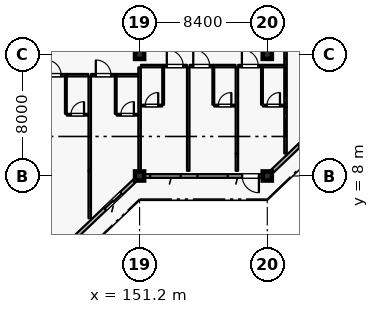
"""IFC4 building model, lengths in metres.
Left out: names, types, materials, properties, quantities, classifications, styles, units other than length and angle.
Written with IfcOpenShell. Run it as: python <this file> out.ifc"""

import sys

from ifc_helpers import new_model, si_unit, direction, frame, frame_2d, origin, origin_2d, place, context, subcontext, project, spatial, rectangle, extrude, element, fill, save


model = new_model("IFC4")
c1 = context("Model", 3, precision=1e-05, world=origin(), true_north=direction((0.0, 1.0)))
c2 = subcontext(c1, "Body", "Model", "MODEL_VIEW")
j1 = project(units=[si_unit("LENGTHUNIT", "METRE"), si_unit("PLANEANGLEUNIT", "RADIAN")], contexts=[c1])
p1 = place(None, origin())
s1 = spatial("IfcSite", under=j1, at=p1, CompositionType="ELEMENT")
p2 = place(p1, origin())
s2 = spatial("IfcBuilding", under=s1, at=p2, CompositionType="ELEMENT")
p3 = place(p2, frame((0.0, 0.0, 39.6)))
s3 = spatial("IfcBuildingStorey", under=s2, at=p3, CompositionType="ELEMENT", Elevation=39.6)
for number, where, z_axis, x_axis in (
    (1, (151.2, 8.0, 0.0), (0.0, 0.0, 1.0), (1.0, 0.0, 0.0)),
    (2, (159.6, 8.0, 0.0), (0.0, 0.0, 1.0), (1.0, 0.0, 0.0)),
    (3, (151.2, 16.0, 0.0), (0.0, 0.0, 1.0), (1.0, 0.0, 0.0)),
    (4, (159.6, 16.0, 0.0), (0.0, 0.0, 1.0), (1.0, 0.0, 0.0)),
):
    element("IfcColumn", number, at=place(p3, frame(where, z_axis=z_axis, x_axis=x_axis)), inside=s3, PredefinedType="COLUMN", context=c2, shape_type="SweptSolid", body=[
        extrude(rectangle(XDim=0.6, YDim=0.6, at=origin_2d()), origin(), (0.0, 0.0, 1.0), 3.6),
    ])
p4 = place(p3, frame((150.9, 7.714, 0.0), z_axis=(0.0, 0.0, 1.0), x_axis=(-0.724145477467, -0.689647248573, 0.0)))
e5 = element("IfcWall", 5, at=p4, inside=s3, PredefinedType="SOLIDWALL", context=c2, shape_type="SweptSolid", body=[
    extrude(rectangle(XDim=10.771, YDim=0.24, at=frame_2d((5.385, 0.0))), origin(), (0.0, 0.0, 1.0), 2.94),
])
p5 = place(p4, frame((1.238, 0.0, 0.0)))
e6 = element("IfcOpeningElement", 6, at=p5, cuts=e5, PredefinedType="OPENING", context=c2, shape_type="SweptSolid", body=[
    extrude(rectangle(XDim=1.5, YDim=2.25, at=frame_2d((0.75, 1.125))), frame((0.0, 0.13, 0.0), z_axis=(0.0, -1.0, 0.0), x_axis=(1.0, 0.0, 0.0)), (0.0, 0.0, 1.0), 0.26),
])
p6 = place(p4, frame((5.58, 0.0, 0.8)))
e7 = element("IfcOpeningElement", 7, at=p6, cuts=e5, PredefinedType="OPENING", context=c2, shape_type="SweptSolid", body=[
    extrude(rectangle(XDim=1.6, YDim=1.6, at=frame_2d((0.8, 0.8))), frame((0.0, 0.13, 0.0), z_axis=(0.0, -1.0, 0.0), x_axis=(1.0, 0.0, 0.0)), (0.0, 0.0, 1.0), 0.26),
])
p7 = place(p4, frame((8.977, 0.0, 0.8)))
e8 = element("IfcOpeningElement", 8, at=p7, cuts=e5, PredefinedType="OPENING", context=c2, shape_type="SweptSolid", body=[
    extrude(rectangle(XDim=1.6, YDim=1.6, at=frame_2d((0.8, 0.8))), frame((0.0, 0.13, 0.0), z_axis=(0.0, -1.0, 0.0), x_axis=(1.0, 0.0, 0.0)), (0.0, 0.0, 1.0), 0.26),
])
p8 = place(p3, frame((159.3, 8.0, 0.0), z_axis=(0.0, 0.0, 1.0), x_axis=(-1.0, 0.0, 0.0)))
e9 = element("IfcWall", 9, at=p8, inside=s3, PredefinedType="SOLIDWALL", context=c2, shape_type="SweptSolid", body=[
    extrude(rectangle(XDim=7.8, YDim=0.24, at=frame_2d((3.9, 0.0))), origin(), (0.0, 0.0, 1.0), 2.94),
])
p9 = place(p8, frame((0.25, 0.0, 0.0)))
e10 = element("IfcOpeningElement", 10, at=p9, cuts=e9, PredefinedType="OPENING", context=c2, shape_type="SweptSolid", body=[
    extrude(rectangle(XDim=1.1, YDim=2.2, at=frame_2d((0.55, 1.1))), frame((0.0, 0.13, 0.0), z_axis=(0.0, -1.0, 0.0), x_axis=(1.0, 0.0, 0.0)), (0.0, 0.0, 1.0), 0.26),
])
p10 = place(p8, frame((2.3, 0.0, 0.8)))
e11 = element("IfcOpeningElement", 11, at=p10, cuts=e9, PredefinedType="OPENING", context=c2, shape_type="SweptSolid", body=[
    extrude(rectangle(XDim=2.0, YDim=1.75, at=frame_2d((1.0, 0.875))), frame((0.0, 0.13, 0.0), z_axis=(0.0, -1.0, 0.0), x_axis=(1.0, 0.0, 0.0)), (0.0, 0.0, 1.0), 0.26),
])
p11 = place(p8, frame((5.4, 0.0, 0.8)))
e12 = element("IfcOpeningElement", 12, at=p11, cuts=e9, PredefinedType="OPENING", context=c2, shape_type="SweptSolid", body=[
    extrude(rectangle(XDim=2.0, YDim=1.75, at=frame_2d((1.0, 0.875))), frame((0.0, 0.13, 0.0), z_axis=(0.0, -1.0, 0.0), x_axis=(1.0, 0.0, 0.0)), (0.0, 0.0, 1.0), 0.26),
])
p12 = place(p3, frame((167.7, 15.714, 0.0), z_axis=(0.0, 0.0, 1.0), x_axis=(-0.724156257633, -0.689635928973, 0.0)))
e13 = element("IfcWall", 13, at=p12, inside=s3, PredefinedType="SOLIDWALL", context=c2, shape_type="SweptSolid", body=[
    extrude(rectangle(XDim=10.771, YDim=0.24, at=frame_2d((5.386, 0.0))), origin(), (0.0, 0.0, 1.0), 2.94),
])
p13 = place(p12, frame((2.15, 0.0, 0.0)))
e14 = element("IfcOpeningElement", 14, at=p13, cuts=e13, PredefinedType="OPENING", context=c2, shape_type="SweptSolid", body=[
    extrude(rectangle(XDim=1.5, YDim=2.25, at=frame_2d((0.75, 1.125))), frame((0.0, 0.13, 0.0), z_axis=(0.0, -1.0, 0.0), x_axis=(1.0, 0.0, 0.0)), (0.0, 0.0, 1.0), 0.26),
])
p14 = place(p12, frame((6.319, 0.0, 0.8)))
e15 = element("IfcOpeningElement", 15, at=p14, cuts=e13, PredefinedType="OPENING", context=c2, shape_type="SweptSolid", body=[
    extrude(rectangle(XDim=2.0, YDim=1.75, at=frame_2d((1.0, 0.875))), frame((0.0, 0.13, 0.0), z_axis=(0.0, -1.0, 0.0), x_axis=(1.0, 0.0, 0.0)), (0.0, 0.0, 1.0), 0.26),
])
p15 = place(p3, frame((144.73, 14.63, 0.0), z_axis=(0.0, 0.0, 1.0), x_axis=(1.0, 0.0, 0.0)))
e16 = element("IfcWall", 16, at=p15, inside=s3, PredefinedType="PARTITIONING", context=c2, shape_type="SweptSolid", body=[
    extrude(rectangle(XDim=1.62, YDim=0.16, at=frame_2d((0.81, 0.0))), origin(), (0.0, 0.0, 1.0), 3.335),
])
p16 = place(p15, frame((0.31, 0.0, 0.0)))
e17 = element("IfcOpeningElement", 17, at=p16, cuts=e16, PredefinedType="OPENING", context=c2, shape_type="SweptSolid", body=[
    extrude(rectangle(XDim=1.0, YDim=2.25, at=frame_2d((0.5, 1.125))), frame((0.0, 0.09, 0.0), z_axis=(0.0, -1.0, 0.0), x_axis=(1.0, 0.0, 0.0)), (0.0, 0.0, 1.0), 0.18),
])
p17 = place(p3, frame((146.36, 14.63, 0.0), z_axis=(0.0, 0.0, 1.0), x_axis=(1.0, 0.0, 0.0)))
e18 = element("IfcWall", 18, at=p17, inside=s3, PredefinedType="PARTITIONING", context=c2, shape_type="SweptSolid", body=[
    extrude(rectangle(XDim=1.47, YDim=0.16, at=frame_2d((0.735, 0.0))), origin(), (0.0, 0.0, 1.0), 3.335),
])
p18 = place(p3, frame((146.35, 12.09, 0.0), z_axis=(0.0, 0.0, 1.0), x_axis=(0.0, 1.0, 0.0)))
e19 = element("IfcWall", 19, at=p18, inside=s3, PredefinedType="PARTITIONING", context=c2, shape_type="SweptSolid", body=[
    extrude(rectangle(XDim=2.45, YDim=0.115, at=frame_2d((1.225, 0.0))), origin(), (0.0, 0.0, 1.0), 3.335),
])
p19 = place(p3, frame((146.41, 12.03, 0.0), z_axis=(0.0, 0.0, 1.0), x_axis=(1.0, 0.0, 0.0)))
e20 = element("IfcWall", 20, at=p19, inside=s3, PredefinedType="PARTITIONING", context=c2, shape_type="SweptSolid", body=[
    extrude(rectangle(XDim=1.41, YDim=0.115, at=frame_2d((0.705, 0.0))), origin(), (0.0, 0.0, 1.0), 3.335),
])
p20 = place(p19, frame((0.275, 0.0, 0.0)))
e21 = element("IfcOpeningElement", 21, at=p20, cuts=e20, PredefinedType="OPENING", context=c2, shape_type="SweptSolid", body=[
    extrude(rectangle(XDim=0.86, YDim=2.12, at=frame_2d((0.43, 1.06))), frame((0.0, 0.067, 0.0), z_axis=(0.0, -1.0, 0.0), x_axis=(1.0, 0.0, 0.0)), (0.0, 0.0, 1.0), 0.135),
])
p21 = place(p3, frame((147.92, 5.22, 0.0), z_axis=(0.0, 0.0, 1.0), x_axis=(0.0, 1.0, 0.0)))
e22 = element("IfcWall", 22, at=p21, inside=s3, PredefinedType="PARTITIONING", context=c2, shape_type="SweptSolid", body=[
    extrude(rectangle(XDim=3.11, YDim=0.16, at=frame_2d((1.555, 0.0))), origin(), (0.0, 0.0, 1.0), 3.335),
])
p22 = place(p3, frame((148.01, 14.63, 0.0), z_axis=(0.0, 0.0, 1.0), x_axis=(1.0, 0.0, 0.0)))
e23 = element("IfcWall", 23, at=p22, inside=s3, PredefinedType="PARTITIONING", context=c2, shape_type="SweptSolid", body=[
    extrude(rectangle(XDim=1.62, YDim=0.16, at=frame_2d((0.81, 0.0))), origin(), (0.0, 0.0, 1.0), 3.335),
])
p23 = place(p22, frame((0.31, 0.0, 0.0)))
e24 = element("IfcOpeningElement", 24, at=p23, cuts=e23, PredefinedType="OPENING", context=c2, shape_type="SweptSolid", body=[
    extrude(rectangle(XDim=1.0, YDim=2.25, at=frame_2d((0.5, 1.125))), frame((0.0, 0.09, 0.0), z_axis=(0.0, -1.0, 0.0), x_axis=(1.0, 0.0, 0.0)), (0.0, 0.0, 1.0), 0.18),
])
p24 = place(p3, frame((149.64, 14.63, 0.0), z_axis=(0.0, 0.0, 1.0), x_axis=(1.0, 0.0, 0.0)))
e25 = element("IfcWall", 25, at=p24, inside=s3, PredefinedType="PARTITIONING", context=c2, shape_type="SweptSolid", body=[
    extrude(rectangle(XDim=1.47, YDim=0.16, at=frame_2d((0.735, 0.0))), origin(), (0.0, 0.0, 1.0), 3.335),
])
p25 = place(p3, frame((149.63, 12.09, 0.0), z_axis=(0.0, 0.0, 1.0), x_axis=(0.0, 1.0, 0.0)))
e26 = element("IfcWall", 26, at=p25, inside=s3, PredefinedType="PARTITIONING", context=c2, shape_type="SweptSolid", body=[
    extrude(rectangle(XDim=2.45, YDim=0.115, at=frame_2d((1.225, 0.0))), origin(), (0.0, 0.0, 1.0), 3.335),
])
p26 = place(p3, frame((149.69, 12.03, 0.0), z_axis=(0.0, 0.0, 1.0), x_axis=(1.0, 0.0, 0.0)))
e27 = element("IfcWall", 27, at=p26, inside=s3, PredefinedType="PARTITIONING", context=c2, shape_type="SweptSolid", body=[
    extrude(rectangle(XDim=1.41, YDim=0.115, at=frame_2d((0.705, 0.0))), origin(), (0.0, 0.0, 1.0), 3.335),
])
p27 = place(p26, frame((0.275, 0.0, 0.0)))
e28 = element("IfcOpeningElement", 28, at=p27, cuts=e27, PredefinedType="OPENING", context=c2, shape_type="SweptSolid", body=[
    extrude(rectangle(XDim=0.86, YDim=2.12, at=frame_2d((0.43, 1.06))), frame((0.0, 0.067, 0.0), z_axis=(0.0, -1.0, 0.0), x_axis=(1.0, 0.0, 0.0)), (0.0, 0.0, 1.0), 0.135),
])
p28 = place(p3, frame((147.92, 8.34, 0.0), z_axis=(0.0, 0.0, 1.0), x_axis=(0.0, 1.0, 0.0)))
e29 = element("IfcWall", 29, at=p28, inside=s3, PredefinedType="PARTITIONING", context=c2, shape_type="SweptSolid", body=[
    extrude(rectangle(XDim=6.2, YDim=0.16, at=frame_2d((3.1, 0.0))), origin(), (0.0, 0.0, 1.0), 3.335),
])
p29 = place(p3, frame((151.29, 15.23, 0.0), z_axis=(0.0, 0.0, 1.0), x_axis=(1.0, 0.0, 0.0)))
e30 = element("IfcWall", 30, at=p29, inside=s3, PredefinedType="PARTITIONING", context=c2, shape_type="SweptSolid", body=[
    extrude(rectangle(XDim=1.45, YDim=0.16, at=frame_2d((0.725, 0.0))), origin(), (0.0, 0.0, 1.0), 3.335),
])
p30 = place(p3, frame((152.75, 15.23, 0.0), z_axis=(0.0, 0.0, 1.0), x_axis=(1.0, 0.0, 0.0)))
e31 = element("IfcWall", 31, at=p30, inside=s3, PredefinedType="PARTITIONING", context=c2, shape_type="SweptSolid", body=[
    extrude(rectangle(XDim=1.56, YDim=0.16, at=frame_2d((0.78, 0.0))), origin(), (0.0, 0.0, 1.0), 3.335),
])
p31 = place(p30, frame((0.24, 0.0, 0.0)))
e32 = element("IfcOpeningElement", 32, at=p31, cuts=e31, PredefinedType="OPENING", context=c2, shape_type="SweptSolid", body=[
    extrude(rectangle(XDim=1.08, YDim=2.3, at=frame_2d((0.54, 1.15))), frame((0.0, 0.09, 0.0), z_axis=(0.0, -1.0, 0.0), x_axis=(1.0, 0.0, 0.0)), (0.0, 0.0, 1.0), 0.18),
])
p32 = place(p3, frame((152.75, 12.69, 0.0), z_axis=(0.0, 0.0, 1.0), x_axis=(0.0, 1.0, 0.0)))
e33 = element("IfcWall", 33, at=p32, inside=s3, PredefinedType="PARTITIONING", context=c2, shape_type="SweptSolid", body=[
    extrude(rectangle(XDim=2.45, YDim=0.115, at=frame_2d((1.225, 0.0))), origin(), (0.0, 0.0, 1.0), 3.335),
])
p33 = place(p3, frame((151.3, 12.63, 0.0), z_axis=(0.0, 0.0, 1.0), x_axis=(1.0, 0.0, 0.0)))
e34 = element("IfcWall", 34, at=p33, inside=s3, PredefinedType="PARTITIONING", context=c2, shape_type="SweptSolid", body=[
    extrude(rectangle(XDim=1.39, YDim=0.115, at=frame_2d((0.695, 0.0))), origin(), (0.0, 0.0, 1.0), 3.335),
])
p34 = place(p33, frame((0.265, 0.0, 0.0)))
e35 = element("IfcOpeningElement", 35, at=p34, cuts=e34, PredefinedType="OPENING", context=c2, shape_type="SweptSolid", body=[
    extrude(rectangle(XDim=0.86, YDim=2.12, at=frame_2d((0.43, 1.06))), frame((0.0, 0.067, 0.0), z_axis=(0.0, -1.0, 0.0), x_axis=(1.0, 0.0, 0.0)), (0.0, 0.0, 1.0), 0.135),
])
p35 = place(p3, frame((151.2, 8.34, 0.0), z_axis=(0.0, 0.0, 1.0), x_axis=(0.0, 1.0, 0.0)))
e36 = element("IfcWall", 36, at=p35, inside=s3, PredefinedType="PARTITIONING", context=c2, shape_type="SweptSolid", body=[
    extrude(rectangle(XDim=6.8, YDim=0.16, at=frame_2d((3.4, 0.0))), origin(), (0.0, 0.0, 1.0), 2.74),
])
p36 = place(p3, frame((154.49, 15.23, 0.0), z_axis=(0.0, 0.0, 1.0), x_axis=(1.0, 0.0, 0.0)))
e37 = element("IfcWall", 37, at=p36, inside=s3, PredefinedType="PARTITIONING", context=c2, shape_type="SweptSolid", body=[
    extrude(rectangle(XDim=1.56, YDim=0.16, at=frame_2d((0.78, 0.0))), origin(), (0.0, 0.0, 1.0), 3.335),
])
p37 = place(p36, frame((0.24, 0.0, 0.0)))
e38 = element("IfcOpeningElement", 38, at=p37, cuts=e37, PredefinedType="OPENING", context=c2, shape_type="SweptSolid", body=[
    extrude(rectangle(XDim=1.08, YDim=2.3, at=frame_2d((0.54, 1.15))), frame((0.0, 0.09, 0.0), z_axis=(0.0, -1.0, 0.0), x_axis=(1.0, 0.0, 0.0)), (0.0, 0.0, 1.0), 0.18),
])
p38 = place(p3, frame((156.06, 15.23, 0.0), z_axis=(0.0, 0.0, 1.0), x_axis=(1.0, 0.0, 0.0)))
e39 = element("IfcWall", 39, at=p38, inside=s3, PredefinedType="PARTITIONING", context=c2, shape_type="SweptSolid", body=[
    extrude(rectangle(XDim=1.45, YDim=0.16, at=frame_2d((0.725, 0.0))), origin(), (0.0, 0.0, 1.0), 3.335),
])
p39 = place(p3, frame((156.05, 12.69, 0.0), z_axis=(0.0, 0.0, 1.0), x_axis=(0.0, 1.0, 0.0)))
e40 = element("IfcWall", 40, at=p39, inside=s3, PredefinedType="PARTITIONING", context=c2, shape_type="SweptSolid", body=[
    extrude(rectangle(XDim=2.45, YDim=0.115, at=frame_2d((1.225, 0.0))), origin(), (0.0, 0.0, 1.0), 3.335),
])
p40 = place(p3, frame((156.11, 12.63, 0.0), z_axis=(0.0, 0.0, 1.0), x_axis=(1.0, 0.0, 0.0)))
e41 = element("IfcWall", 41, at=p40, inside=s3, PredefinedType="PARTITIONING", context=c2, shape_type="SweptSolid", body=[
    extrude(rectangle(XDim=1.39, YDim=0.115, at=frame_2d((0.695, 0.0))), origin(), (0.0, 0.0, 1.0), 3.335),
])
p41 = place(p40, frame((0.265, 0.0, 0.0)))
e42 = element("IfcOpeningElement", 42, at=p41, cuts=e41, PredefinedType="OPENING", context=c2, shape_type="SweptSolid", body=[
    extrude(rectangle(XDim=0.86, YDim=2.12, at=frame_2d((0.43, 1.06))), frame((0.0, 0.067, 0.0), z_axis=(0.0, -1.0, 0.0), x_axis=(1.0, 0.0, 0.0)), (0.0, 0.0, 1.0), 0.135),
])
p42 = place(p3, frame((154.4, 8.34, 0.0), z_axis=(0.0, 0.0, 1.0), x_axis=(0.0, 1.0, 0.0)))
e43 = element("IfcWall", 43, at=p42, inside=s3, PredefinedType="PARTITIONING", context=c2, shape_type="SweptSolid", body=[
    extrude(rectangle(XDim=6.8, YDim=0.16, at=frame_2d((3.4, 0.0))), origin(), (0.0, 0.0, 1.0), 3.335),
])
p43 = place(p3, frame((157.6, 8.34, 0.0), z_axis=(0.0, 0.0, 1.0), x_axis=(0.0, 1.0, 0.0)))
e44 = element("IfcWall", 44, at=p43, inside=s3, PredefinedType="PARTITIONING", context=c2, shape_type="SweptSolid", body=[
    extrude(rectangle(XDim=1.13, YDim=0.16, at=frame_2d((0.565, 0.0))), origin(), (0.0, 0.0, 1.0), 3.335),
])
p44 = place(p3, frame((157.69, 15.23, 0.0), z_axis=(0.0, 0.0, 1.0), x_axis=(1.0, 0.0, 0.0)))
e45 = element("IfcWall", 45, at=p44, inside=s3, PredefinedType="PARTITIONING", context=c2, shape_type="SweptSolid", body=[
    extrude(rectangle(XDim=1.56, YDim=0.16, at=frame_2d((0.78, 0.0))), origin(), (0.0, 0.0, 1.0), 3.335),
])
p45 = place(p44, frame((0.24, 0.0, 0.0)))
e46 = element("IfcOpeningElement", 46, at=p45, cuts=e45, PredefinedType="OPENING", context=c2, shape_type="SweptSolid", body=[
    extrude(rectangle(XDim=1.08, YDim=2.3, at=frame_2d((0.54, 1.15))), frame((0.0, 0.09, 0.0), z_axis=(0.0, -1.0, 0.0), x_axis=(1.0, 0.0, 0.0)), (0.0, 0.0, 1.0), 0.18),
])
p46 = place(p3, frame((159.26, 15.23, 0.0), z_axis=(0.0, 0.0, 1.0), x_axis=(1.0, 0.0, 0.0)))
e47 = element("IfcWall", 47, at=p46, inside=s3, PredefinedType="PARTITIONING", context=c2, shape_type="SweptSolid", body=[
    extrude(rectangle(XDim=1.45, YDim=0.16, at=frame_2d((0.725, 0.0))), origin(), (0.0, 0.0, 1.0), 3.335),
])
p47 = place(p3, frame((159.25, 12.69, 0.0), z_axis=(0.0, 0.0, 1.0), x_axis=(0.0, 1.0, 0.0)))
e48 = element("IfcWall", 48, at=p47, inside=s3, PredefinedType="PARTITIONING", context=c2, shape_type="SweptSolid", body=[
    extrude(rectangle(XDim=2.45, YDim=0.115, at=frame_2d((1.225, 0.0))), origin(), (0.0, 0.0, 1.0), 3.335),
])
p48 = place(p3, frame((159.31, 12.63, 0.0), z_axis=(0.0, 0.0, 1.0), x_axis=(1.0, 0.0, 0.0)))
e49 = element("IfcWall", 49, at=p48, inside=s3, PredefinedType="PARTITIONING", context=c2, shape_type="SweptSolid", body=[
    extrude(rectangle(XDim=1.39, YDim=0.115, at=frame_2d((0.695, 0.0))), origin(), (0.0, 0.0, 1.0), 3.335),
])
p49 = place(p48, frame((0.265, 0.0, 0.0)))
e50 = element("IfcOpeningElement", 50, at=p49, cuts=e49, PredefinedType="OPENING", context=c2, shape_type="SweptSolid", body=[
    extrude(rectangle(XDim=0.86, YDim=2.12, at=frame_2d((0.43, 1.06))), frame((0.0, 0.067, 0.0), z_axis=(0.0, -1.0, 0.0), x_axis=(1.0, 0.0, 0.0)), (0.0, 0.0, 1.0), 0.135),
])
p50 = place(p3, frame((157.6, 9.48, 0.0), z_axis=(0.0, 0.0, 1.0), x_axis=(0.0, 1.0, 0.0)))
e51 = element("IfcWall", 51, at=p50, inside=s3, PredefinedType="PARTITIONING", context=c2, shape_type="SweptSolid", body=[
    extrude(rectangle(XDim=5.66, YDim=0.16, at=frame_2d((2.83, 0.0))), origin(), (0.0, 0.0, 1.0), 3.335),
])
p51 = place(p3, frame((160.8, 9.48, 0.0), z_axis=(0.0, 0.0, 1.0), x_axis=(0.0, 1.0, 0.0)))
e52 = element("IfcWall", 52, at=p51, inside=s3, PredefinedType="PARTITIONING", context=c2, shape_type="SweptSolid", body=[
    extrude(rectangle(XDim=3.04, YDim=0.16, at=frame_2d((1.52, 0.0))), origin(), (0.0, 0.0, 1.0), 3.335),
])
p52 = place(p3, frame((160.8, 12.53, 0.0), z_axis=(0.0, 0.0, 1.0), x_axis=(0.0, 1.0, 0.0)))
e53 = element("IfcWall", 53, at=p52, inside=s3, PredefinedType="PARTITIONING", context=c2, shape_type="SweptSolid", body=[
    extrude(rectangle(XDim=9.55, YDim=0.16, at=frame_2d((4.775, 0.0))), origin(), (0.0, 0.0, 1.0), 3.335),
])
p53 = place(p5, origin())
e54 = element("IfcDoor", 54, at=p53, inside=s3, OperationType="SLIDING_TO_LEFT", PredefinedType="DOOR", context=c2, shape_type="SweptSolid", body=[
    extrude(rectangle(XDim=1.5, YDim=2.25, at=frame_2d((0.75, 1.125))), frame((0.0, 0.025, 0.0), z_axis=(0.0, -1.0, 0.0), x_axis=(1.0, 0.0, 0.0)), (0.0, 0.0, 1.0), 0.05),
])
fill(e6, e54)
p54 = place(p9, origin())
e55 = element("IfcDoor", 55, at=p54, inside=s3, OperationType="SINGLE_SWING_LEFT", PredefinedType="DOOR", context=c2, shape_type="SweptSolid", body=[
    extrude(rectangle(XDim=1.1, YDim=2.2, at=frame_2d((0.55, 1.1))), frame((0.0, 0.025, 0.0), z_axis=(0.0, -1.0, 0.0), x_axis=(1.0, 0.0, 0.0)), (0.0, 0.0, 1.0), 0.05),
])
fill(e10, e55)
p55 = place(p10, origin())
e56 = element("IfcWindow", 56, at=p55, inside=s3, PartitioningType="DOUBLE_PANEL_VERTICAL", PredefinedType="WINDOW", context=c2, shape_type="SweptSolid", body=[
    extrude(rectangle(XDim=2.0, YDim=1.75, at=frame_2d((1.0, 0.875))), frame((0.0, 0.03, 0.0), z_axis=(0.0, -1.0, 0.0), x_axis=(1.0, 0.0, 0.0)), (0.0, 0.0, 1.0), 0.06),
])
fill(e11, e56)
p56 = place(p11, origin())
e57 = element("IfcWindow", 57, at=p56, inside=s3, PartitioningType="DOUBLE_PANEL_VERTICAL", PredefinedType="WINDOW", context=c2, shape_type="SweptSolid", body=[
    extrude(rectangle(XDim=2.0, YDim=1.75, at=frame_2d((1.0, 0.875))), frame((0.0, 0.03, 0.0), z_axis=(0.0, -1.0, 0.0), x_axis=(1.0, 0.0, 0.0)), (0.0, 0.0, 1.0), 0.06),
])
fill(e12, e57)
p57 = place(p14, origin())
e58 = element("IfcWindow", 58, at=p57, inside=s3, PartitioningType="DOUBLE_PANEL_VERTICAL", PredefinedType="WINDOW", context=c2, shape_type="SweptSolid", body=[
    extrude(rectangle(XDim=2.0, YDim=1.75, at=frame_2d((1.0, 0.875))), frame((0.0, 0.03, 0.0), z_axis=(0.0, -1.0, 0.0), x_axis=(1.0, 0.0, 0.0)), (0.0, 0.0, 1.0), 0.06),
])
fill(e15, e58)
p58 = place(p16, origin())
e59 = element("IfcDoor", 59, at=p58, inside=s3, OperationType="SINGLE_SWING_LEFT", PredefinedType="DOOR", context=c2, shape_type="SweptSolid", body=[
    extrude(rectangle(XDim=1.0, YDim=2.25, at=frame_2d((0.5, 1.125))), frame((0.0, 0.025, 0.0), z_axis=(0.0, -1.0, 0.0), x_axis=(1.0, 0.0, 0.0)), (0.0, 0.0, 1.0), 0.05),
])
fill(e17, e59)
p59 = place(p20, origin())
e60 = element("IfcDoor", 60, at=p59, inside=s3, OperationType="SINGLE_SWING_RIGHT", PredefinedType="DOOR", context=c2, shape_type="SweptSolid", body=[
    extrude(rectangle(XDim=0.86, YDim=2.12, at=frame_2d((0.43, 1.06))), frame((0.0, 0.025, 0.0), z_axis=(0.0, -1.0, 0.0), x_axis=(1.0, 0.0, 0.0)), (0.0, 0.0, 1.0), 0.05),
])
fill(e21, e60)
p60 = place(p23, origin())
e61 = element("IfcDoor", 61, at=p60, inside=s3, OperationType="SINGLE_SWING_LEFT", PredefinedType="DOOR", context=c2, shape_type="SweptSolid", body=[
    extrude(rectangle(XDim=1.0, YDim=2.25, at=frame_2d((0.5, 1.125))), frame((0.0, 0.025, 0.0), z_axis=(0.0, -1.0, 0.0), x_axis=(1.0, 0.0, 0.0)), (0.0, 0.0, 1.0), 0.05),
])
fill(e24, e61)
p61 = place(p27, origin())
e62 = element("IfcDoor", 62, at=p61, inside=s3, OperationType="SINGLE_SWING_RIGHT", PredefinedType="DOOR", context=c2, shape_type="SweptSolid", body=[
    extrude(rectangle(XDim=0.86, YDim=2.12, at=frame_2d((0.43, 1.06))), frame((0.0, 0.025, 0.0), z_axis=(0.0, -1.0, 0.0), x_axis=(1.0, 0.0, 0.0)), (0.0, 0.0, 1.0), 0.05),
])
fill(e28, e62)
p62 = place(p31, origin())
e63 = element("IfcDoor", 63, at=p62, inside=s3, OperationType="SINGLE_SWING_LEFT", PredefinedType="DOOR", context=c2, shape_type="SweptSolid", body=[
    extrude(rectangle(XDim=1.08, YDim=2.3, at=frame_2d((0.54, 1.15))), frame((0.0, 0.025, 0.0), z_axis=(0.0, -1.0, 0.0), x_axis=(1.0, 0.0, 0.0)), (0.0, 0.0, 1.0), 0.05),
])
fill(e32, e63)
p63 = place(p34, origin())
e64 = element("IfcDoor", 64, at=p63, inside=s3, OperationType="SINGLE_SWING_RIGHT", PredefinedType="DOOR", context=c2, shape_type="SweptSolid", body=[
    extrude(rectangle(XDim=0.86, YDim=2.12, at=frame_2d((0.43, 1.06))), frame((0.0, 0.025, 0.0), z_axis=(0.0, -1.0, 0.0), x_axis=(1.0, 0.0, 0.0)), (0.0, 0.0, 1.0), 0.05),
])
fill(e35, e64)
p64 = place(p37, origin())
e65 = element("IfcDoor", 65, at=p64, inside=s3, OperationType="SINGLE_SWING_LEFT", PredefinedType="DOOR", context=c2, shape_type="SweptSolid", body=[
    extrude(rectangle(XDim=1.08, YDim=2.3, at=frame_2d((0.54, 1.15))), frame((0.0, 0.025, 0.0), z_axis=(0.0, -1.0, 0.0), x_axis=(1.0, 0.0, 0.0)), (0.0, 0.0, 1.0), 0.05),
])
fill(e38, e65)
p65 = place(p41, origin())
e66 = element("IfcDoor", 66, at=p65, inside=s3, OperationType="SINGLE_SWING_RIGHT", PredefinedType="DOOR", context=c2, shape_type="SweptSolid", body=[
    extrude(rectangle(XDim=0.86, YDim=2.12, at=frame_2d((0.43, 1.06))), frame((0.0, 0.025, 0.0), z_axis=(0.0, -1.0, 0.0), x_axis=(1.0, 0.0, 0.0)), (0.0, 0.0, 1.0), 0.05),
])
fill(e42, e66)
p66 = place(p45, origin())
e67 = element("IfcDoor", 67, at=p66, inside=s3, OperationType="SINGLE_SWING_LEFT", PredefinedType="DOOR", context=c2, shape_type="SweptSolid", body=[
    extrude(rectangle(XDim=1.08, YDim=2.3, at=frame_2d((0.54, 1.15))), frame((0.0, 0.025, 0.0), z_axis=(0.0, -1.0, 0.0), x_axis=(1.0, 0.0, 0.0)), (0.0, 0.0, 1.0), 0.05),
])
fill(e46, e67)
p67 = place(p49, origin())
e68 = element("IfcDoor", 68, at=p67, inside=s3, OperationType="SINGLE_SWING_RIGHT", PredefinedType="DOOR", context=c2, shape_type="SweptSolid", body=[
    extrude(rectangle(XDim=0.86, YDim=2.12, at=frame_2d((0.43, 1.06))), frame((0.0, 0.025, 0.0), z_axis=(0.0, -1.0, 0.0), x_axis=(1.0, 0.0, 0.0)), (0.0, 0.0, 1.0), 0.05),
])
fill(e50, e68)
save(model, sys.argv[1])
